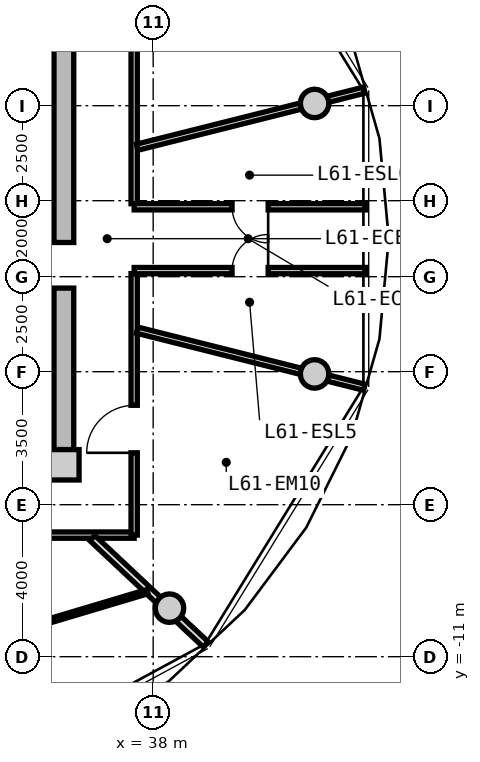
"""IFC4 building model, lengths in metres.
Left out: names, types, materials, properties, quantities, classifications, styles, units other than length and angle.
Written with IfcOpenShell. Run it as: python <this file> out.ifc"""

import sys

from ifc_helpers import new_model, si_unit, direction, frame, frame_2d, origin, origin_2d, place, context, subcontext, project, spatial, rectangle, circle, extrude, source, transform, mapped, element, fill, save


model = new_model("IFC4")
c1 = context("Model", 3, precision=1e-05, world=origin(), true_north=direction((0.0, 1.0)))
c2 = subcontext(c1, "Body", "Model", "MODEL_VIEW")
j1 = project(units=[si_unit("LENGTHUNIT", "METRE"), si_unit("PLANEANGLEUNIT", "RADIAN")], contexts=[c1])
p1 = place(None, origin())
s1 = spatial("IfcSite", under=j1, at=p1, CompositionType="ELEMENT")
p2 = place(p1, origin())
s2 = spatial("IfcBuilding", under=s1, at=p2, CompositionType="ELEMENT")
p3 = place(p2, frame((0.0, 0.0, 196.75)))
s3 = spatial("IfcBuildingStorey", under=s2, at=p3, CompositionType="ELEMENT", Elevation=196.75)
m1 = source(origin(), c2, "Body", "SweptSolid", [
    extrude(rectangle(XDim=0.8, YDim=0.8, at=origin_2d()), origin(), (0.0, 0.0, 1.0), 3.05),
])
p4 = place(p3, frame((35.65, -5.95, 0.0), z_axis=(0.0, 0.0, 1.0), x_axis=(1.0, 0.0, 0.0)))
e1 = element("IfcColumn", 1, at=p4, inside=s3, PredefinedType="COLUMN", context=c2, shape_type="MappedRepresentation", body=[
    mapped(m1, transform((0.0, 0.0, 0.0), x_axis=(1.0, 0.0, 0.0), y_axis=(0.0, 1.0, 0.0), z_axis=(0.0, 0.0, 1.0), scale=1.0)),
])
m2 = source(origin(), c2, "Body", "SweptSolid", [
    extrude(rectangle(XDim=11.1, YDim=0.52, at=frame_2d((5.55, 0.0))), origin(), (0.0, 0.0, 1.0), 2.76),
])
p5 = place(p3, frame((35.65, 5.55, 0.0), z_axis=(0.0, 0.0, 1.0), x_axis=(0.0, -1.0, 0.0)))
e2 = element("IfcWall", 2, at=p5, inside=s3, PredefinedType="SHEAR", context=c2, shape_type="MappedRepresentation", body=[
    mapped(m2, transform((0.0, 0.0, 0.0), x_axis=(1.0, 0.0, 0.0), y_axis=(0.0, 1.0, 0.0), z_axis=(0.0, 0.0, 1.0), scale=1.0)),
])
p6 = place(p5, frame((5.65, 0.0, 0.0)))
e3 = element("IfcOpeningElement", 3, at=p6, cuts=e2, PredefinedType="OPENING", context=c2, shape_type="SweptSolid", body=[
    extrude(rectangle(XDim=1.2, YDim=2.15, at=frame_2d((0.6, 1.075))), frame((0.0, 0.27, 0.0), z_axis=(0.0, -1.0, 0.0), x_axis=(1.0, 0.0, 0.0)), (0.0, 0.0, 1.0), 0.54),
])
m3 = source(origin(), c2, "Body", "SweptSolid", [
    extrude(circle(Radius=0.375, at=origin_2d()), origin(), (0.0, 0.0, 1.0), 3.05),
])
for number, where, z_axis, x_axis in (
    (4, (42.247, 3.559, 0.0), (0.0, 0.0, 1.0), (1.0, 0.0, 0.0)),
    (5, (38.43, -9.723, 0.0), (0.0, 0.0, 1.0), (1.0, 0.0, 0.0)),
    (6, (42.247, -3.559, 0.0), (0.0, 0.0, 1.0), (1.0, 0.0, 0.0)),
):
    element("IfcColumn", number, at=place(p3, frame(where, z_axis=z_axis, x_axis=x_axis)), inside=s3, PredefinedType="COLUMN", context=c2, shape_type="MappedRepresentation", body=[
        mapped(m3, transform((0.0, 0.0, 0.0), x_axis=(1.0, 0.0, 0.0), y_axis=(0.0, 1.0, 0.0), z_axis=(0.0, 0.0, 1.0), scale=1.0)),
    ])
m4 = source(origin(), c2, "Body", "SweptSolid", [
    extrude(rectangle(XDim=19.0, YDim=0.165, at=frame_2d((9.5, 0.0))), origin(), (0.0, 0.0, 1.0), 2.745),
])
p7 = place(p3, frame((37.5, -7.8, 0.0), z_axis=(0.0, 0.0, 1.0), x_axis=(-1.0, 0.0, 0.0)))
e7 = element("IfcWall", 7, at=p7, inside=s3, PredefinedType="PARTITIONING", context=c2, shape_type="MappedRepresentation", body=[
    mapped(m4, transform((0.0, 0.0, 0.0), x_axis=(1.0, 0.0, 0.0), y_axis=(0.0, 1.0, 0.0), z_axis=(0.0, 0.0, 1.0), scale=1.0)),
])
p8 = place(p7, frame((9.392, 0.0, 0.0)))
e8 = element("IfcOpeningElement", 8, at=p8, cuts=e7, PredefinedType="OPENING", context=c2, shape_type="SweptSolid", body=[
    extrude(rectangle(XDim=1.05, YDim=2.15, at=frame_2d((0.525, 1.075))), frame((0.0, 0.093, 0.0), z_axis=(0.0, -1.0, 0.0), x_axis=(1.0, 0.0, 0.0)), (0.0, 0.0, 1.0), 0.185),
])
m5 = source(origin(), c2, "Body", "SweptSolid", [
    extrude(rectangle(XDim=6.88, YDim=0.165, at=frame_2d((3.44, 0.0))), origin(), (0.0, 0.0, 1.0), 2.745),
])
p9 = place(p3, frame((37.5, 7.8, 0.0), z_axis=(0.0, 0.0, 1.0), x_axis=(0.0, -1.0, 0.0)))
e9 = element("IfcWall", 9, at=p9, inside=s3, PredefinedType="PARTITIONING", context=c2, shape_type="MappedRepresentation", body=[
    mapped(m5, transform((0.0, 0.0, 0.0), x_axis=(1.0, 0.0, 0.0), y_axis=(0.0, 1.0, 0.0), z_axis=(0.0, 0.0, 1.0), scale=1.0)),
])
p10 = place(p3, frame((37.5, -0.92, 0.0), z_axis=(0.0, 0.0, 1.0), x_axis=(0.0, -1.0, 0.0)))
e10 = element("IfcWall", 10, at=p10, inside=s3, PredefinedType="PARTITIONING", context=c2, shape_type="MappedRepresentation", body=[
    mapped(m5, transform((0.0, 0.0, 0.0), x_axis=(1.0, 0.0, 0.0), y_axis=(0.0, 1.0, 0.0), z_axis=(0.0, 0.0, 1.0), scale=1.0)),
])
p11 = place(p10, frame((3.464, 0.0, 0.0)))
e11 = element("IfcOpeningElement", 11, at=p11, cuts=e10, PredefinedType="OPENING", context=c2, shape_type="SweptSolid", body=[
    extrude(rectangle(XDim=1.25, YDim=2.2, at=frame_2d((0.625, 1.1))), frame((0.0, 0.093, 0.0), z_axis=(0.0, -1.0, 0.0), x_axis=(1.0, 0.0, 0.0)), (0.0, 0.0, 1.0), 0.185),
])
m6 = source(origin(), c2, "Body", "SweptSolid", [
    extrude(rectangle(XDim=6.157, YDim=0.165, at=frame_2d((3.079, 0.0))), origin(), (0.0, 0.0, 1.0), 2.345),
])
for number, where, z_axis, x_axis in (
    (12, (37.58, -2.407, 0.0), (0.0, 0.0, 1.0), (0.97, -0.244, 0.0)),
    (13, (37.58, 2.407, 0.0), (0.0, 0.0, 1.0), (0.97, 0.244, 0.0)),
):
    element("IfcWall", number, at=place(p3, frame(where, z_axis=z_axis, x_axis=x_axis)), inside=s3, PredefinedType="PARTITIONING", context=c2, shape_type="MappedRepresentation", body=[
        mapped(m6, transform((0.0, 0.0, 0.0), x_axis=(1.0, 0.0, 0.0), y_axis=(0.0, 1.0, 0.0), z_axis=(0.0, 0.0, 1.0), scale=1.0)),
    ])
m7 = source(origin(), c2, "Body", "SweptSolid", [
    extrude(rectangle(XDim=6.101, YDim=0.165, at=frame_2d((3.051, 0.0))), origin(), (0.0, 0.0, 1.0), 2.745),
])
p12 = place(p3, frame((37.5, 0.84, 0.0), z_axis=(0.0, 0.0, 1.0), x_axis=(1.0, 0.0, 0.0)))
e14 = element("IfcWall", 14, at=p12, inside=s3, PredefinedType="PARTITIONING", context=c2, shape_type="MappedRepresentation", body=[
    mapped(m7, transform((0.0, 0.0, 0.0), x_axis=(1.0, 0.0, 0.0), y_axis=(0.0, 1.0, 0.0), z_axis=(0.0, 0.0, 1.0), scale=1.0)),
])
p13 = place(p12, frame((2.576, 0.0, 0.0)))
e15 = element("IfcOpeningElement", 15, at=p13, cuts=e14, PredefinedType="OPENING", context=c2, shape_type="SweptSolid", body=[
    extrude(rectangle(XDim=0.95, YDim=2.1, at=frame_2d((0.475, 1.05))), frame((0.0, 0.093, 0.0), z_axis=(0.0, -1.0, 0.0), x_axis=(1.0, 0.0, 0.0)), (0.0, 0.0, 1.0), 0.185),
])
p14 = place(p3, frame((43.601, -0.84, 0.0), z_axis=(0.0, 0.0, 1.0), x_axis=(-1.0, 0.0, 0.0)))
e16 = element("IfcWall", 16, at=p14, inside=s3, PredefinedType="PARTITIONING", context=c2, shape_type="MappedRepresentation", body=[
    mapped(m7, transform((0.0, 0.0, 0.0), x_axis=(1.0, 0.0, 0.0), y_axis=(0.0, 1.0, 0.0), z_axis=(0.0, 0.0, 1.0), scale=1.0)),
])
p15 = place(p14, frame((2.576, 0.0, 0.0)))
e17 = element("IfcOpeningElement", 17, at=p15, cuts=e16, PredefinedType="OPENING", context=c2, shape_type="SweptSolid", body=[
    extrude(rectangle(XDim=0.95, YDim=2.1, at=frame_2d((0.475, 1.05))), frame((0.0, 0.093, 0.0), z_axis=(0.0, -1.0, 0.0), x_axis=(1.0, 0.0, 0.0)), (0.0, 0.0, 1.0), 0.185),
])
m8 = source(origin(), c2, "Body", "SweptSolid", [
    extrude(rectangle(XDim=4.089, YDim=0.19, at=frame_2d((2.044, 0.0))), origin(), (0.0, 0.0, 1.0), 2.345),
])
p16 = place(p3, frame((36.402, -7.88, 0.0), z_axis=(0.0, 0.0, 1.0), x_axis=(0.729401273609, -0.684086092577, 0.0)))
e18 = element("IfcWall", 18, at=p16, inside=s3, PredefinedType="PARTITIONING", context=c2, shape_type="MappedRepresentation", body=[
    mapped(m8, transform((0.0, 0.0, 0.0), x_axis=(1.0, 0.0, 0.0), y_axis=(0.0, 1.0, 0.0), z_axis=(0.0, 0.0, 1.0), scale=1.0)),
])
m9 = source(origin(), c2, "Body", "SweptSolid", [
    extrude(rectangle(XDim=6.936, YDim=0.115, at=frame_2d((3.468, 0.0))), origin(), (0.0, 0.0, 1.0), 2.745),
])
p17 = place(p3, frame((31.203, -11.272, 0.0), z_axis=(0.0, 0.0, 1.0), x_axis=(0.958186895835, 0.286143098205, 0.0)))
e19 = element("IfcWall", 19, at=p17, inside=s3, PredefinedType="PARTITIONING", context=c2, shape_type="MappedRepresentation", body=[
    mapped(m9, transform((0.0, 0.0, 0.0), x_axis=(1.0, 0.0, 0.0), y_axis=(0.0, 1.0, 0.0), z_axis=(0.0, 0.0, 1.0), scale=1.0)),
])
p18 = place(p17, frame((2.993, 0.0, 0.0)))
e20 = element("IfcOpeningElement", 20, at=p18, cuts=e19, PredefinedType="OPENING", context=c2, shape_type="SweptSolid", body=[
    extrude(rectangle(XDim=0.95, YDim=2.1, at=frame_2d((0.475, 1.05))), frame((0.0, 0.067, 0.0), z_axis=(0.0, -1.0, 0.0), x_axis=(1.0, 0.0, 0.0)), (0.0, 0.0, 1.0), 0.135),
])
m10 = source(origin(), c2, "Body", "SweptSolid", [
    extrude(rectangle(XDim=1.2, YDim=2.15, at=frame_2d((0.6, 1.075))), frame((0.0, 0.025, 0.0), z_axis=(0.0, -1.0, 0.0), x_axis=(1.0, 0.0, 0.0)), (0.0, 0.0, 1.0), 0.05),
])
p19 = place(p6, frame((1.2, 0.0, 0.0), z_axis=(0.0, 0.0, 1.0), x_axis=(-1.0, 0.0, 0.0)))
e21 = element("IfcDoor", 21, at=p19, inside=s3, OperationType="SINGLE_SWING_RIGHT", PredefinedType="DOOR", context=c2, shape_type="MappedRepresentation", body=[
    mapped(m10, transform((0.0, 0.0, 0.0), x_axis=(1.0, 0.0, 0.0), y_axis=(0.0, 1.0, 0.0), z_axis=(0.0, 0.0, 1.0), scale=1.0)),
])
fill(e3, e21)
m11 = source(origin(), c2, "Body", "SweptSolid", [
    extrude(rectangle(XDim=0.95, YDim=2.1, at=frame_2d((0.475, 1.05))), frame((0.0, 0.025, 0.0), z_axis=(0.0, -1.0, 0.0), x_axis=(1.0, 0.0, 0.0)), (0.0, 0.0, 1.0), 0.05),
])
p20 = place(p15, frame((0.95, 0.0, 0.0), z_axis=(0.0, 0.0, 1.0), x_axis=(-1.0, 0.0, 0.0)))
e22 = element("IfcDoor", 22, at=p20, inside=s3, OperationType="SINGLE_SWING_RIGHT", PredefinedType="DOOR", context=c2, shape_type="MappedRepresentation", body=[
    mapped(m11, transform((0.0, 0.0, 0.0), x_axis=(1.0, 0.0, 0.0), y_axis=(0.0, 1.0, 0.0), z_axis=(0.0, 0.0, 1.0), scale=1.0)),
])
fill(e17, e22)
p21 = place(p13, frame((0.95, 0.0, 0.0), z_axis=(0.0, 0.0, 1.0), x_axis=(-1.0, 0.0, 0.0)))
e23 = element("IfcDoor", 23, at=p21, inside=s3, OperationType="SINGLE_SWING_LEFT", PredefinedType="DOOR", context=c2, shape_type="MappedRepresentation", body=[
    mapped(m11, transform((0.0, 0.0, 0.0), x_axis=(1.0, 0.0, 0.0), y_axis=(0.0, 1.0, 0.0), z_axis=(0.0, 0.0, 1.0), scale=1.0)),
])
fill(e15, e23)
m12 = source(origin(), c2, "Body", "SweptSolid", [
    extrude(rectangle(XDim=1.25, YDim=2.2, at=frame_2d((0.625, 1.1))), frame((0.0, 0.025, 0.0), z_axis=(0.0, -1.0, 0.0), x_axis=(1.0, 0.0, 0.0)), (0.0, 0.0, 1.0), 0.05),
])
p22 = place(p11, frame((1.25, 0.0, 0.0), z_axis=(0.0, 0.0, 1.0), x_axis=(-1.0, 0.0, 0.0)))
e24 = element("IfcDoor", 24, at=p22, inside=s3, OperationType="SINGLE_SWING_LEFT", PredefinedType="DOOR", context=c2, shape_type="MappedRepresentation", body=[
    mapped(m12, transform((0.0, 0.0, 0.0), x_axis=(1.0, 0.0, 0.0), y_axis=(0.0, 1.0, 0.0), z_axis=(0.0, 0.0, 1.0), scale=1.0)),
])
fill(e11, e24)
save(model, sys.argv[1])
